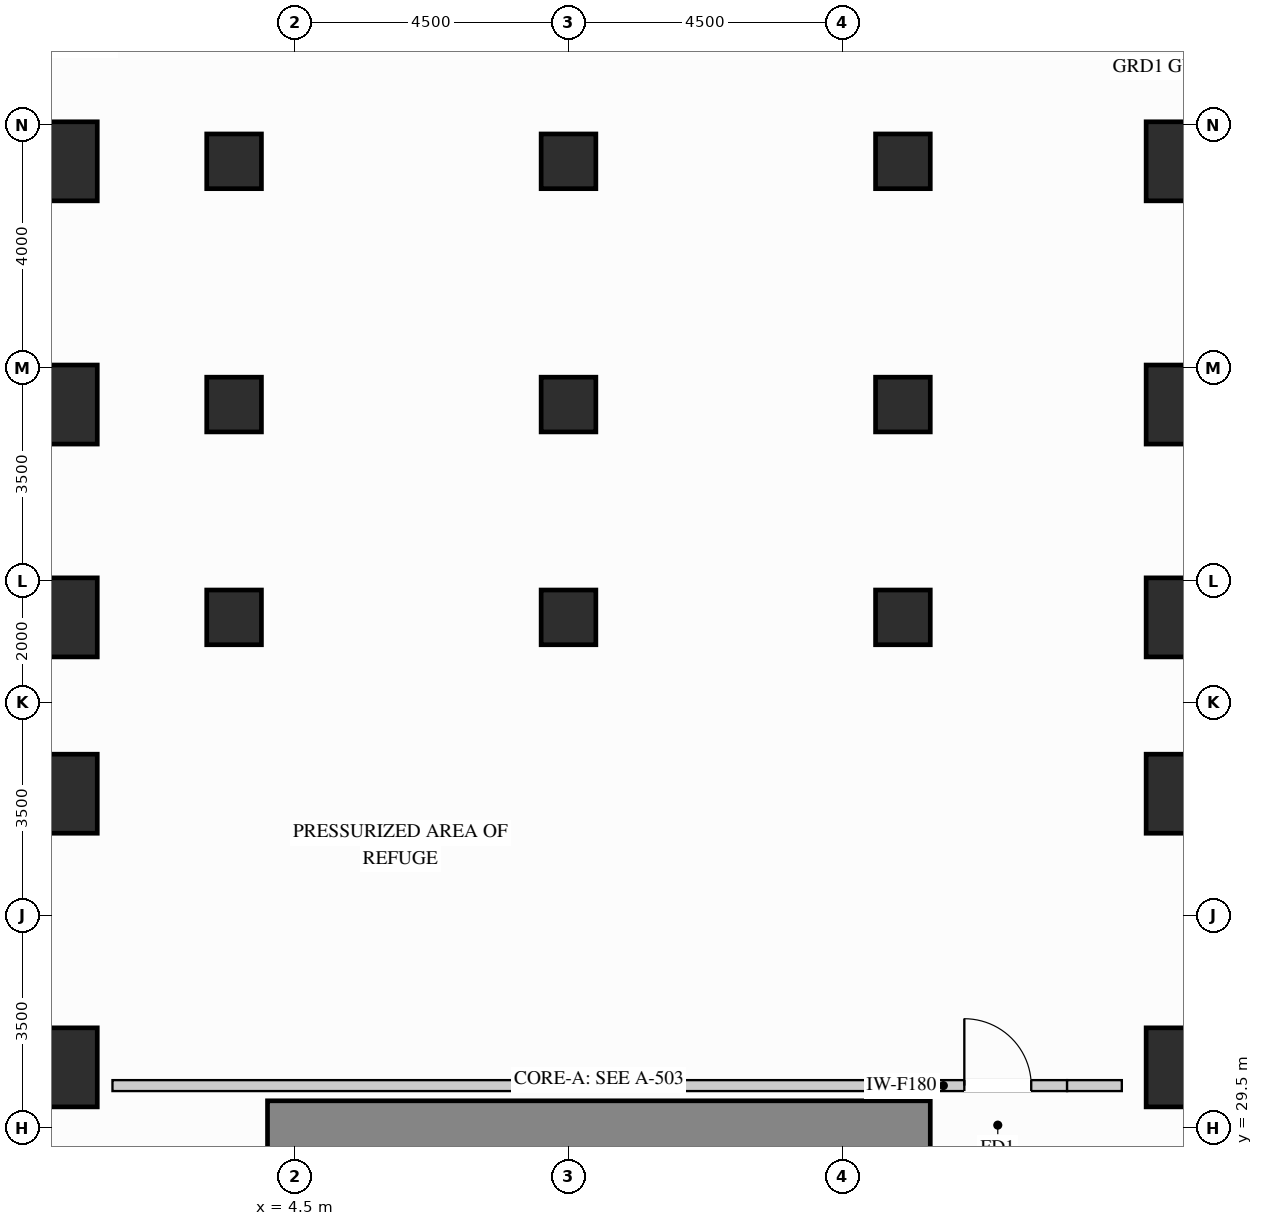
"""IFC4 building model, lengths in metres.
Left out: names, types, materials, properties, quantities, classifications, styles, units other than length and angle.
Written with IfcOpenShell. Run it as: python <this file> out.ifc"""

import sys

from ifc_helpers import new_model, si_unit, direction, frame, frame_2d, origin, origin_2d, place, context, subcontext, project, spatial, rectangle, extrude, source, transform, mapped, element, fill, save


model = new_model("IFC4")
c1 = context("Model", 3, precision=1e-05, world=origin(), true_north=direction((0.0, 1.0)))
c2 = subcontext(c1, "Body", "Model", "MODEL_VIEW")
j1 = project(units=[si_unit("LENGTHUNIT", "METRE"), si_unit("PLANEANGLEUNIT", "RADIAN")], contexts=[c1])
p1 = place(None, origin())
s1 = spatial("IfcSite", under=j1, at=p1, CompositionType="ELEMENT")
p2 = place(p1, origin())
s2 = spatial("IfcBuilding", under=s1, at=p2, CompositionType="ELEMENT")
p3 = place(p2, frame((0.0, 0.0, 72.9)))
s3 = spatial("IfcBuildingStorey", under=s2, at=p3, CompositionType="ELEMENT", Elevation=72.9)
m1 = source(origin(), c2, "Body", "SweptSolid", [
    extrude(rectangle(XDim=0.9, YDim=0.9, at=origin_2d()), origin(), (0.0, 0.0, 1.0), 4.26),
])
for number, where, z_axis, x_axis in (
    (1, (14.5, 37.9, 0.0), (0.0, 0.0, 1.0), (1.0, 0.0, 0.0)),
    (2, (14.5, 41.4, 0.0), (0.0, 0.0, 1.0), (1.0, 0.0, 0.0)),
    (3, (14.5, 45.4, 0.0), (0.0, 0.0, 1.0), (1.0, 0.0, 0.0)),
    (4, (3.5, 37.9, 0.0), (0.0, 0.0, 1.0), (1.0, 0.0, 0.0)),
    (5, (3.5, 41.4, 0.0), (0.0, 0.0, 1.0), (1.0, 0.0, 0.0)),
    (6, (3.5, 45.4, 0.0), (0.0, 0.0, 1.0), (1.0, 0.0, 0.0)),
    (7, (9.0, 37.9, 0.0), (0.0, 0.0, 1.0), (1.0, 0.0, 0.0)),
    (8, (9.0, 41.4, 0.0), (0.0, 0.0, 1.0), (1.0, 0.0, 0.0)),
    (9, (9.0, 45.4, 0.0), (0.0, 0.0, 1.0), (1.0, 0.0, 0.0)),
):
    element("IfcColumn", number, at=place(p3, frame(where, z_axis=z_axis, x_axis=x_axis)), inside=s3, PredefinedType="COLUMN", context=c2, shape_type="MappedRepresentation", body=[
        mapped(m1, transform((0.0, 0.0, 0.0), x_axis=(1.0, 0.0, 0.0), y_axis=(0.0, 1.0, 0.0), z_axis=(0.0, 0.0, 1.0))),
    ])
m2 = source(origin(), c2, "Body", "SweptSolid", [
    extrude(rectangle(XDim=1.0, YDim=1.3, at=origin_2d()), origin(), (0.0, 0.0, 1.0), 4.26),
])
for number, where, z_axis, x_axis in (
    (10, (19.0, 30.5, 0.0), (0.0, 0.0, 1.0), (1.0, 0.0, 0.0)),
    (11, (19.0, 35.0, 0.0), (0.0, 0.0, 1.0), (1.0, 0.0, 0.0)),
    (12, (19.0, 37.9, 0.0), (0.0, 0.0, 1.0), (1.0, 0.0, 0.0)),
    (13, (19.0, 41.4, 0.0), (0.0, 0.0, 1.0), (1.0, 0.0, 0.0)),
    (14, (19.0, 45.4, 0.0), (0.0, 0.0, 1.0), (1.0, 0.0, 0.0)),
):
    element("IfcColumn", number, at=place(p3, frame(where, z_axis=z_axis, x_axis=x_axis)), inside=s3, PredefinedType="COLUMN", context=c2, shape_type="MappedRepresentation", body=[
        mapped(m2, transform((0.0, 0.0, 0.0), x_axis=(1.0, 0.0, 0.0), y_axis=(0.0, 1.0, 0.0), z_axis=(0.0, 0.0, 1.0))),
    ])
m3 = source(origin(), c2, "Body", "SweptSolid", [
    extrude(rectangle(XDim=1.3, YDim=1.3, at=origin_2d()), origin(), (0.0, 0.0, 1.0), 4.26),
])
for number, where, z_axis, x_axis in (
    (15, (0.6, 30.5, 0.0), (0.0, 0.0, 1.0), (1.0, 0.0, 0.0)),
    (16, (0.6, 35.0, 0.0), (0.0, 0.0, 1.0), (1.0, 0.0, 0.0)),
    (17, (0.6, 37.9, 0.0), (0.0, 0.0, 1.0), (1.0, 0.0, 0.0)),
    (18, (0.6, 41.4, 0.0), (0.0, 0.0, 1.0), (1.0, 0.0, 0.0)),
    (19, (0.6, 45.4, 0.0), (0.0, 0.0, 1.0), (1.0, 0.0, 0.0)),
):
    element("IfcColumn", number, at=place(p3, frame(where, z_axis=z_axis, x_axis=x_axis)), inside=s3, PredefinedType="COLUMN", context=c2, shape_type="MappedRepresentation", body=[
        mapped(m3, transform((0.0, 0.0, 0.0), x_axis=(1.0, 0.0, 0.0), y_axis=(0.0, 1.0, 0.0), z_axis=(0.0, 0.0, 1.0))),
    ])
m4 = source(origin(), c2, "Body", "SweptSolid", [
    extrude(rectangle(XDim=10.9, YDim=0.9, at=frame_2d((5.45, 0.0))), origin(), (0.0, 0.0, 1.0), 4.26),
])
p4 = place(p3, frame((4.05, 29.5, 0.0), z_axis=(0.0, 0.0, 1.0), x_axis=(1.0, 0.0, 0.0)))
e20 = element("IfcWall", 20, at=p4, inside=s3, PredefinedType="SHEAR", context=c2, shape_type="MappedRepresentation", body=[
    mapped(m4, transform((0.0, 0.0, 0.0), x_axis=(1.0, 0.0, 0.0), y_axis=(0.0, 1.0, 0.0), z_axis=(0.0, 0.0, 1.0))),
])
p5 = place(p3, frame((14.92, 30.2, 0.0), z_axis=(0.0, 0.0, 1.0), x_axis=(1.0, 0.0, 0.0)))
e21 = element("IfcWall", 21, at=p5, inside=s3, PredefinedType="PARTITIONING", context=c2, shape_type="SweptSolid", body=[
    extrude(rectangle(XDim=2.28, YDim=0.18, at=frame_2d((1.14, 0.0))), origin(), (0.0, 0.0, 1.0), 4.245),
])
p6 = place(p5, frame((0.59, 0.0, 0.0)))
e22 = element("IfcOpeningElement", 22, at=p6, cuts=e21, PredefinedType="OPENING", context=c2, shape_type="SweptSolid", body=[
    extrude(rectangle(XDim=1.1, YDim=2.15, at=frame_2d((0.55, 1.075))), frame((0.0, 0.1, 0.0), z_axis=(0.0, -1.0, 0.0), x_axis=(1.0, 0.0, 0.0)), (0.0, 0.0, 1.0), 0.2),
])
m5 = source(origin(), c2, "Body", "SweptSolid", [
    extrude(rectangle(XDim=13.42, YDim=0.18, at=frame_2d((6.71, 0.0))), origin(), (0.0, 0.0, 1.0), 4.245),
])
p7 = place(p3, frame((1.5, 30.2, 0.0), z_axis=(0.0, 0.0, 1.0), x_axis=(1.0, 0.0, 0.0)))
e23 = element("IfcWall", 23, at=p7, inside=s3, PredefinedType="PARTITIONING", context=c2, shape_type="MappedRepresentation", body=[
    mapped(m5, transform((0.0, 0.0, 0.0), x_axis=(1.0, 0.0, 0.0), y_axis=(0.0, 1.0, 0.0), z_axis=(0.0, 0.0, 1.0))),
])
m6 = source(origin(), c2, "Body", "SweptSolid", [
    extrude(rectangle(XDim=0.9, YDim=0.18, at=frame_2d((0.45, 0.0))), origin(), (0.0, 0.0, 1.0), 4.245),
])
p8 = place(p3, frame((17.2, 30.2, 0.0), z_axis=(0.0, 0.0, 1.0), x_axis=(1.0, 0.0, 0.0)))
e24 = element("IfcWall", 24, at=p8, inside=s3, PredefinedType="PARTITIONING", context=c2, shape_type="MappedRepresentation", body=[
    mapped(m6, transform((0.0, 0.0, 0.0), x_axis=(1.0, 0.0, 0.0), y_axis=(0.0, 1.0, 0.0), z_axis=(0.0, 0.0, 1.0))),
])
m7 = source(origin(), c2, "Body", "SweptSolid", [
    extrude(rectangle(XDim=1.1, YDim=2.15, at=frame_2d((0.55, 1.075))), frame((0.0, 0.025, 0.0), z_axis=(0.0, -1.0, 0.0), x_axis=(1.0, 0.0, 0.0)), (0.0, 0.0, 1.0), 0.05),
])
p9 = place(p6, origin())
e25 = element("IfcDoor", 25, at=p9, inside=s3, OperationType="SINGLE_SWING_LEFT", PredefinedType="DOOR", context=c2, shape_type="MappedRepresentation", body=[
    mapped(m7, transform((0.0, 0.0, 0.0), x_axis=(1.0, 0.0, 0.0), y_axis=(0.0, 1.0, 0.0), z_axis=(0.0, 0.0, 1.0))),
])
fill(e22, e25)
save(model, sys.argv[1])
